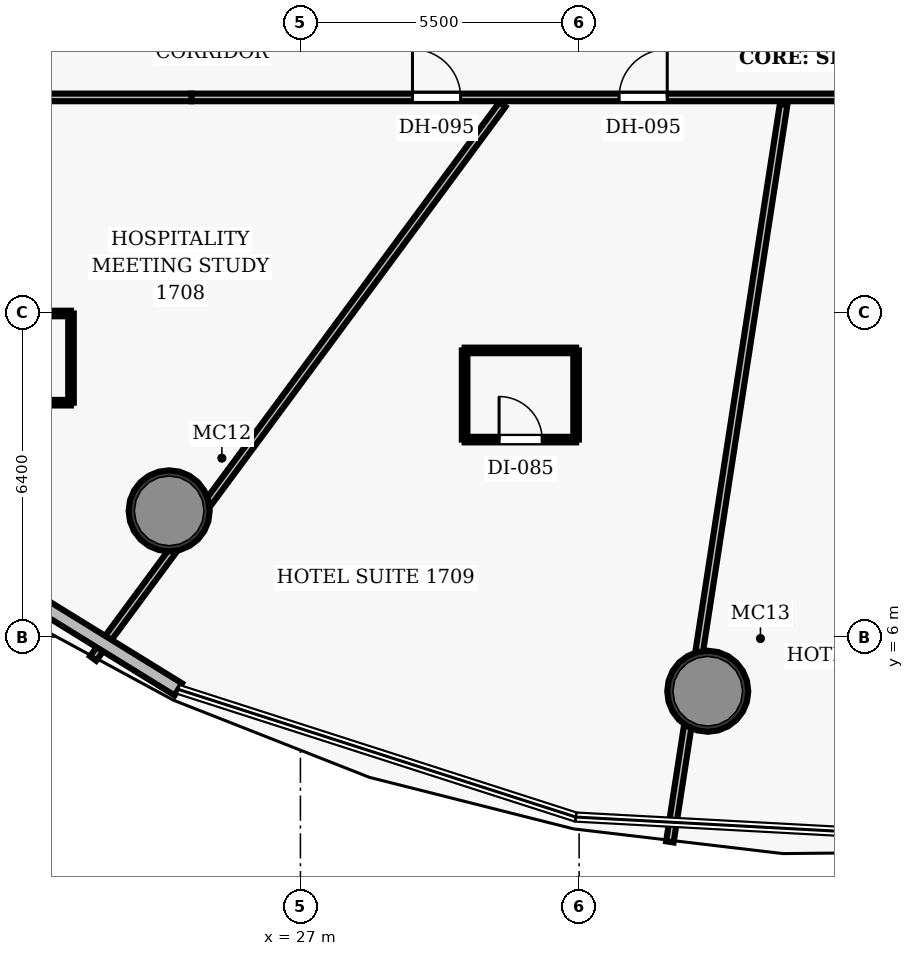
"""IFC4 building model, lengths in metres.
Left out: names, types, materials, properties, quantities, classifications, styles, units other than length and angle.
Written with IfcOpenShell. Run it as: python <this file> out.ifc"""

import sys

from ifc_helpers import new_model, si_unit, direction, frame, frame_2d, origin, origin_2d, place, context, subcontext, project, spatial, rectangle, hollow_circle, extrude, element, fill, save


model = new_model("IFC4")
c1 = context("Model", 3, precision=1e-05, world=origin(), true_north=direction((0.0, 1.0)))
c2 = subcontext(c1, "Body", "Model", "MODEL_VIEW")
j1 = project(units=[si_unit("LENGTHUNIT", "METRE"), si_unit("PLANEANGLEUNIT", "RADIAN")], contexts=[c1])
p1 = place(None, origin())
s1 = spatial("IfcSite", under=j1, at=p1, CompositionType="ELEMENT")
p2 = place(p1, origin())
s2 = spatial("IfcBuilding", under=s1, at=p2, CompositionType="ELEMENT")
p3 = place(p2, frame((0.0, 0.0, 76.4)))
s3 = spatial("IfcBuildingStorey", under=s2, at=p3, CompositionType="ELEMENT", Elevation=76.4)
for number, where, z_axis, x_axis in (
    (1, (24.41, 8.491, 0.0), (0.0, 0.0, 1.0), (1.0, 0.0, 0.0)),
    (2, (35.039, 4.931, 0.0), (0.0, 0.0, 1.0), (1.0, 0.0, 0.0)),
):
    element("IfcColumn", number, at=place(p3, frame(where, z_axis=z_axis, x_axis=x_axis)), inside=s3, PredefinedType="COLUMN", context=c2, shape_type="SweptSolid", body=[
        extrude(hollow_circle(Radius=0.8, WallThickness=0.06, at=origin_2d()), origin(), (0.0, 0.0, 1.0), 3.5),
    ])
p4 = place(p3, frame((24.85, 16.65, 0.0), z_axis=(0.0, 0.0, 1.0), x_axis=(1.0, 0.0, 0.0)))
e3 = element("IfcWall", 3, at=p4, inside=s3, PredefinedType="PARTITIONING", context=c2, shape_type="SweptSolid", body=[
    extrude(rectangle(XDim=23.5, YDim=0.15, at=frame_2d((11.75, 0.0))), origin(), (0.0, 0.0, 1.0), 2.6),
])
p5 = place(p4, frame((4.362, 0.0, 0.0)))
e4 = element("IfcOpeningElement", 4, at=p5, cuts=e3, PredefinedType="OPENING", context=c2, shape_type="SweptSolid", body=[
    extrude(rectangle(XDim=0.95, YDim=2.15, at=frame_2d((0.475, 1.075))), frame((0.0, 0.085, 0.0), z_axis=(0.0, -1.0, 0.0), x_axis=(1.0, 0.0, 0.0)), (0.0, 0.0, 1.0), 0.17),
])
p6 = place(p4, frame((8.439, 0.0, 0.0)))
e5 = element("IfcOpeningElement", 5, at=p6, cuts=e3, PredefinedType="OPENING", context=c2, shape_type="SweptSolid", body=[
    extrude(rectangle(XDim=0.95, YDim=2.15, at=frame_2d((0.475, 1.075))), frame((0.0, 0.085, 0.0), z_axis=(0.0, -1.0, 0.0), x_axis=(1.0, 0.0, 0.0)), (0.0, 0.0, 1.0), 0.17),
])
p7 = place(p4, frame((14.893, 0.0, 0.0)))
e6 = element("IfcOpeningElement", 6, at=p7, cuts=e3, PredefinedType="OPENING", context=c2, shape_type="SweptSolid", body=[
    extrude(rectangle(XDim=0.95, YDim=2.15, at=frame_2d((0.475, 1.075))), frame((0.0, 0.085, 0.0), z_axis=(0.0, -1.0, 0.0), x_axis=(1.0, 0.0, 0.0)), (0.0, 0.0, 1.0), 0.17),
])
p8 = place(p4, frame((17.475, 0.0, 0.0)))
e7 = element("IfcOpeningElement", 7, at=p8, cuts=e3, PredefinedType="OPENING", context=c2, shape_type="SweptSolid", body=[
    extrude(rectangle(XDim=0.95, YDim=2.15, at=frame_2d((0.475, 1.075))), frame((0.0, 0.085, 0.0), z_axis=(0.0, -1.0, 0.0), x_axis=(1.0, 0.0, 0.0)), (0.0, 0.0, 1.0), 0.17),
])
p9 = place(p3, frame((11.287, 16.65, 0.0), z_axis=(0.0, 0.0, 1.0), x_axis=(1.0, 0.0, 0.0)))
e8 = element("IfcWall", 8, at=p9, inside=s3, PredefinedType="PARTITIONING", context=c2, shape_type="SweptSolid", body=[
    extrude(rectangle(XDim=13.563, YDim=0.15, at=frame_2d((6.781, 0.0))), origin(), (0.0, 0.0, 1.0), 2.6),
])
p10 = place(p3, frame((30.988, 16.51, 0.0), z_axis=(0.0, 0.0, 1.0), x_axis=(-0.594280459422, -0.804257878761, 0.0)))
e9 = element("IfcWall", 9, at=p10, inside=s3, PredefinedType="PARTITIONING", context=c2, shape_type="SweptSolid", body=[
    extrude(rectangle(XDim=13.593, YDim=0.15, at=frame_2d((6.796, 0.0))), origin(), (0.0, 0.0, 1.0), 2.6),
])
p11 = place(p3, frame((36.536, 16.51, 0.0), z_axis=(0.0, 0.0, 1.0), x_axis=(-0.152462111612, -0.988309316218, 0.0)))
e10 = element("IfcWall", 10, at=p11, inside=s3, PredefinedType="PARTITIONING", context=c2, shape_type="SweptSolid", body=[
    extrude(rectangle(XDim=14.724, YDim=0.15, at=frame_2d((7.362, 0.0))), origin(), (0.0, 0.0, 1.0), 2.6),
])
p12 = place(p3, frame((20.272, 10.626, 0.0), z_axis=(0.0, 0.0, 1.0), x_axis=(1.0, 0.0, 0.0)))
e11 = element("IfcWall", 11, at=p12, inside=s3, PredefinedType="PARTITIONING", context=c2, shape_type="SweptSolid", body=[
    extrude(rectangle(XDim=2.2, YDim=0.11, at=frame_2d((1.1, 0.0))), origin(), (0.0, 0.0, 1.0), 2.6),
])
p13 = place(p12, frame((0.68, 0.0, 0.0)))
e12 = element("IfcOpeningElement", 12, at=p13, cuts=e11, PredefinedType="OPENING", context=c2, shape_type="SweptSolid", body=[
    extrude(rectangle(XDim=0.85, YDim=2.1, at=frame_2d((0.425, 1.05))), frame((0.0, 0.065, 0.0), z_axis=(0.0, -1.0, 0.0), x_axis=(1.0, 0.0, 0.0)), (0.0, 0.0, 1.0), 0.13),
])
p14 = place(p3, frame((20.272, 12.386, 0.0), z_axis=(0.0, 0.0, 1.0), x_axis=(1.0, 0.0, 0.0)))
e13 = element("IfcWall", 13, at=p14, inside=s3, PredefinedType="PARTITIONING", context=c2, shape_type="SweptSolid", body=[
    extrude(rectangle(XDim=2.2, YDim=0.11, at=frame_2d((1.1, 0.0))), origin(), (0.0, 0.0, 1.0), 2.6),
])
p15 = place(p3, frame((22.472, 10.626, 0.0), z_axis=(0.0, 0.0, 1.0), x_axis=(0.0, 1.0, 0.0)))
e14 = element("IfcWall", 14, at=p15, inside=s3, PredefinedType="PARTITIONING", context=c2, shape_type="SweptSolid", body=[
    extrude(rectangle(XDim=1.76, YDim=0.11, at=frame_2d((0.88, 0.0))), origin(), (0.0, 0.0, 1.0), 2.6),
])
p16 = place(p3, frame((30.24, 9.897, 0.0), z_axis=(0.0, 0.0, 1.0), x_axis=(1.0, 0.0, 0.0)))
e15 = element("IfcWall", 15, at=p16, inside=s3, PredefinedType="PARTITIONING", context=c2, shape_type="SweptSolid", body=[
    extrude(rectangle(XDim=2.2, YDim=0.11, at=frame_2d((1.1, 0.0))), origin(), (0.0, 0.0, 1.0), 2.6),
])
p17 = place(p16, frame((0.68, 0.0, 0.0)))
e16 = element("IfcOpeningElement", 16, at=p17, cuts=e15, PredefinedType="OPENING", context=c2, shape_type="SweptSolid", body=[
    extrude(rectangle(XDim=0.85, YDim=2.1, at=frame_2d((0.425, 1.05))), frame((0.0, 0.065, 0.0), z_axis=(0.0, -1.0, 0.0), x_axis=(1.0, 0.0, 0.0)), (0.0, 0.0, 1.0), 0.13),
])
p18 = place(p3, frame((30.24, 11.657, 0.0), z_axis=(0.0, 0.0, 1.0), x_axis=(1.0, 0.0, 0.0)))
e17 = element("IfcWall", 17, at=p18, inside=s3, PredefinedType="PARTITIONING", context=c2, shape_type="SweptSolid", body=[
    extrude(rectangle(XDim=2.2, YDim=0.11, at=frame_2d((1.1, 0.0))), origin(), (0.0, 0.0, 1.0), 2.6),
])
for number, where, z_axis, x_axis in (
    (18, (30.24, 9.897, 0.0), (0.0, 0.0, 1.0), (0.0, 1.0, 0.0)),
    (19, (32.441, 9.897, 0.0), (0.0, 0.0, 1.0), (0.0, 1.0, 0.0)),
):
    element("IfcWall", number, at=place(p3, frame(where, z_axis=z_axis, x_axis=x_axis)), inside=s3, PredefinedType="PARTITIONING", context=c2, shape_type="SweptSolid", body=[
        extrude(rectangle(XDim=1.76, YDim=0.11, at=frame_2d((0.88, 0.0))), origin(), (0.0, 0.0, 1.0), 2.6),
    ])
p19 = place(p3, frame((24.589, 4.969, 0.0), z_axis=(0.0, 0.0, 1.0), x_axis=(-0.8510360128, 0.525107327047, 0.0)))
e20 = element("IfcWall", 20, at=p19, inside=s3, PredefinedType="SOLIDWALL", context=c2, shape_type="SweptSolid", body=[
    extrude(rectangle(XDim=8.171, YDim=0.28, at=frame_2d((4.085, 0.0))), origin(), (0.0, 0.0, 1.0), 3.25),
])
p20 = place(p5, origin())
e21 = element("IfcDoor", 21, at=p20, inside=s3, OperationType="SINGLE_SWING_LEFT", PredefinedType="DOOR", context=c2, shape_type="SweptSolid", body=[
    extrude(rectangle(XDim=0.95, YDim=2.15, at=frame_2d((0.475, 1.075))), frame((0.0, 0.025, 0.0), z_axis=(0.0, -1.0, 0.0), x_axis=(1.0, 0.0, 0.0)), (0.0, 0.0, 1.0), 0.05),
])
fill(e4, e21)
p21 = place(p6, origin())
e22 = element("IfcDoor", 22, at=p21, inside=s3, OperationType="SINGLE_SWING_RIGHT", PredefinedType="DOOR", context=c2, shape_type="SweptSolid", body=[
    extrude(rectangle(XDim=0.95, YDim=2.15, at=frame_2d((0.475, 1.075))), frame((0.0, 0.025, 0.0), z_axis=(0.0, -1.0, 0.0), x_axis=(1.0, 0.0, 0.0)), (0.0, 0.0, 1.0), 0.05),
])
fill(e5, e22)
p22 = place(p17, origin())
e23 = element("IfcDoor", 23, at=p22, inside=s3, OperationType="SINGLE_SWING_LEFT", PredefinedType="DOOR", context=c2, shape_type="SweptSolid", body=[
    extrude(rectangle(XDim=0.85, YDim=2.1, at=frame_2d((0.425, 1.05))), frame((0.0, 0.025, 0.0), z_axis=(0.0, -1.0, 0.0), x_axis=(1.0, 0.0, 0.0)), (0.0, 0.0, 1.0), 0.05),
])
fill(e16, e23)
save(model, sys.argv[1])
